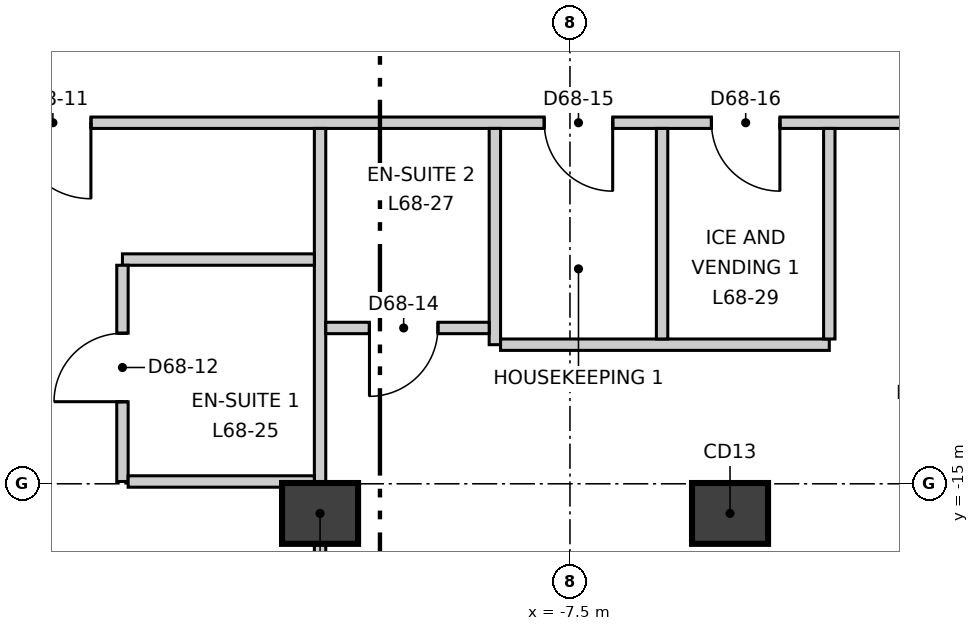
"""IFC4 building model, lengths in metres.
Left out: names, types, materials, properties, quantities, classifications, styles, units other than length and angle.
Written with IfcOpenShell. Run it as: python <this file> out.ifc"""

import sys

from ifc_helpers import new_model, si_unit, direction, frame, frame_2d, origin, origin_2d, place, context, subcontext, project, spatial, rectangle, extrude, element, fill, save


model = new_model("IFC4")
c1 = context("Model", 3, precision=1e-05, world=origin(), true_north=direction((0.0, 1.0)))
c2 = subcontext(c1, "Body", "Model", "MODEL_VIEW")
j1 = project(units=[si_unit("LENGTHUNIT", "METRE"), si_unit("PLANEANGLEUNIT", "RADIAN")], contexts=[c1])
p1 = place(None, origin())
s1 = spatial("IfcSite", under=j1, at=p1, CompositionType="ELEMENT")
p2 = place(p1, origin())
s2 = spatial("IfcBuilding", under=s1, at=p2, CompositionType="ELEMENT")
p3 = place(p2, frame((0.0, 0.0, 289.9)))
s3 = spatial("IfcBuildingStorey", under=s2, at=p3, CompositionType="ELEMENT", Elevation=289.9)
for number, where, z_axis, x_axis in (
    (1, (-10.788, -15.39, -0.3), (0.0, 0.0, 1.0), (1.0, 0.0, 0.0)),
    (2, (-5.394, -15.39, -0.3), (0.0, 0.0, 1.0), (1.0, 0.0, 0.0)),
):
    element("IfcColumn", number, at=place(p3, frame(where, z_axis=z_axis, x_axis=x_axis)), inside=s3, PredefinedType="COLUMN", context=c2, shape_type="SweptSolid", body=[
        extrude(rectangle(XDim=1.0, YDim=0.8, at=origin_2d()), origin(), (0.0, 0.0, 1.0), 3.6),
    ])
p4 = place(p3, frame((-2.494, 27.86, 0.0), z_axis=(0.0, 0.0, 1.0), x_axis=(-0.500008134474, -0.866020707292, 0.0)))
e3 = element("IfcWall", 3, at=p4, inside=s3, PredefinedType="ELEMENTEDWALL", context=c2, shape_type="SweptSolid", body=[
    extrude(rectangle(XDim=45.741, YDim=0.2, at=frame_2d((22.871, 0.0))), origin(), (0.0, 0.0, 1.0), 3.3),
])
p5 = place(p4, frame((2.15, 0.0, 0.9)))
e4 = element("IfcOpeningElement", 4, at=p5, cuts=e3, PredefinedType="OPENING", context=c2, shape_type="SweptSolid", body=[
    extrude(rectangle(XDim=3.7, YDim=2.2, at=frame_2d((1.85, 1.1))), frame((0.0, 0.11, 0.0), z_axis=(0.0, -1.0, 0.0), x_axis=(1.0, 0.0, 0.0)), (0.0, 0.0, 1.0), 0.22),
])
p6 = place(p4, frame((7.544, 0.0, 0.9)))
e5 = element("IfcOpeningElement", 5, at=p6, cuts=e3, PredefinedType="OPENING", context=c2, shape_type="SweptSolid", body=[
    extrude(rectangle(XDim=3.7, YDim=2.2, at=frame_2d((1.85, 1.1))), frame((0.0, 0.11, 0.0), z_axis=(0.0, -1.0, 0.0), x_axis=(1.0, 0.0, 0.0)), (0.0, 0.0, 1.0), 0.22),
])
p7 = place(p4, frame((12.939, 0.0, 0.9)))
e6 = element("IfcOpeningElement", 6, at=p7, cuts=e3, PredefinedType="OPENING", context=c2, shape_type="SweptSolid", body=[
    extrude(rectangle(XDim=3.7, YDim=2.2, at=frame_2d((1.85, 1.1))), frame((0.0, 0.11, 0.0), z_axis=(0.0, -1.0, 0.0), x_axis=(1.0, 0.0, 0.0)), (0.0, 0.0, 1.0), 0.22),
])
p8 = place(p4, frame((18.333, 0.0, 0.9)))
e7 = element("IfcOpeningElement", 7, at=p8, cuts=e3, PredefinedType="OPENING", context=c2, shape_type="SweptSolid", body=[
    extrude(rectangle(XDim=3.7, YDim=2.2, at=frame_2d((1.85, 1.1))), frame((0.0, 0.11, 0.0), z_axis=(0.0, -1.0, 0.0), x_axis=(1.0, 0.0, 0.0)), (0.0, 0.0, 1.0), 0.22),
])
p9 = place(p4, frame((23.728, 0.0, 0.9)))
e8 = element("IfcOpeningElement", 8, at=p9, cuts=e3, PredefinedType="OPENING", context=c2, shape_type="SweptSolid", body=[
    extrude(rectangle(XDim=3.7, YDim=2.2, at=frame_2d((1.85, 1.1))), frame((0.0, 0.11, 0.0), z_axis=(0.0, -1.0, 0.0), x_axis=(1.0, 0.0, 0.0)), (0.0, 0.0, 1.0), 0.22),
])
p10 = place(p4, frame((29.122, 0.0, 0.9)))
e9 = element("IfcOpeningElement", 9, at=p10, cuts=e3, PredefinedType="OPENING", context=c2, shape_type="SweptSolid", body=[
    extrude(rectangle(XDim=3.7, YDim=2.2, at=frame_2d((1.85, 1.1))), frame((0.0, 0.11, 0.0), z_axis=(0.0, -1.0, 0.0), x_axis=(1.0, 0.0, 0.0)), (0.0, 0.0, 1.0), 0.22),
])
p11 = place(p4, frame((34.517, 0.0, 0.9)))
e10 = element("IfcOpeningElement", 10, at=p11, cuts=e3, PredefinedType="OPENING", context=c2, shape_type="SweptSolid", body=[
    extrude(rectangle(XDim=3.7, YDim=2.2, at=frame_2d((1.85, 1.1))), frame((0.0, 0.11, 0.0), z_axis=(0.0, -1.0, 0.0), x_axis=(1.0, 0.0, 0.0)), (0.0, 0.0, 1.0), 0.22),
])
p12 = place(p4, frame((39.911, 0.0, 0.9)))
e11 = element("IfcOpeningElement", 11, at=p12, cuts=e3, PredefinedType="OPENING", context=c2, shape_type="SweptSolid", body=[
    extrude(rectangle(XDim=3.7, YDim=2.2, at=frame_2d((1.85, 1.1))), frame((0.0, 0.11, 0.0), z_axis=(0.0, -1.0, 0.0), x_axis=(1.0, 0.0, 0.0)), (0.0, 0.0, 1.0), 0.22),
])
p13 = place(p3, frame((-17.603, -10.25, 0.0), z_axis=(0.0, 0.0, 1.0), x_axis=(1.0, 0.0, 0.0)))
e12 = element("IfcWall", 12, at=p13, inside=s3, PredefinedType="PARTITIONING", context=c2, shape_type="SweptSolid", body=[
    extrude(rectangle(XDim=35.356, YDim=0.15, at=frame_2d((17.678, 0.0))), origin(), (0.0, 0.0, 1.0), 3.3),
])
p14 = place(p13, frame((2.8, 0.0, 0.0)))
e13 = element("IfcOpeningElement", 13, at=p14, cuts=e12, PredefinedType="OPENING", context=c2, shape_type="SweptSolid", body=[
    extrude(rectangle(XDim=1.0, YDim=2.1, at=frame_2d((0.5, 1.05))), frame((0.0, 0.085, 0.0), z_axis=(0.0, -1.0, 0.0), x_axis=(1.0, 0.0, 0.0)), (0.0, 0.0, 1.0), 0.17),
])
p15 = place(p13, frame((15.065, 0.0, 0.0)))
e14 = element("IfcOpeningElement", 14, at=p15, cuts=e12, PredefinedType="OPENING", context=c2, shape_type="SweptSolid", body=[
    extrude(rectangle(XDim=1.0, YDim=2.1, at=frame_2d((0.5, 1.05))), frame((0.0, 0.085, 0.0), z_axis=(0.0, -1.0, 0.0), x_axis=(1.0, 0.0, 0.0)), (0.0, 0.0, 1.0), 0.17),
])
p16 = place(p13, frame((9.765, 0.0, 0.0)))
e15 = element("IfcOpeningElement", 15, at=p16, cuts=e12, PredefinedType="OPENING", context=c2, shape_type="SweptSolid", body=[
    extrude(rectangle(XDim=0.9, YDim=2.1, at=frame_2d((0.45, 1.05))), frame((0.0, 0.085, 0.0), z_axis=(0.0, -1.0, 0.0), x_axis=(1.0, 0.0, 0.0)), (0.0, 0.0, 1.0), 0.17),
])
p17 = place(p13, frame((11.965, 0.0, 0.0)))
e16 = element("IfcOpeningElement", 16, at=p17, cuts=e12, PredefinedType="OPENING", context=c2, shape_type="SweptSolid", body=[
    extrude(rectangle(XDim=0.9, YDim=2.1, at=frame_2d((0.45, 1.05))), frame((0.0, 0.085, 0.0), z_axis=(0.0, -1.0, 0.0), x_axis=(1.0, 0.0, 0.0)), (0.0, 0.0, 1.0), 0.17),
])
p18 = place(p13, frame((20.953, 0.0, 0.0)))
e17 = element("IfcOpeningElement", 17, at=p18, cuts=e12, PredefinedType="OPENING", context=c2, shape_type="SweptSolid", body=[
    extrude(rectangle(XDim=1.0, YDim=2.1, at=frame_2d((0.5, 1.05))), frame((0.0, 0.085, 0.0), z_axis=(0.0, -1.0, 0.0), x_axis=(1.0, 0.0, 0.0)), (0.0, 0.0, 1.0), 0.17),
])
p19 = place(p13, frame((26.347, 0.0, 0.0)))
e18 = element("IfcOpeningElement", 18, at=p19, cuts=e12, PredefinedType="OPENING", context=c2, shape_type="SweptSolid", body=[
    extrude(rectangle(XDim=1.0, YDim=2.1, at=frame_2d((0.5, 1.05))), frame((0.0, 0.085, 0.0), z_axis=(0.0, -1.0, 0.0), x_axis=(1.0, 0.0, 0.0)), (0.0, 0.0, 1.0), 0.17),
])
p20 = place(p13, frame((31.342, 0.0, 0.0)))
e19 = element("IfcOpeningElement", 19, at=p20, cuts=e12, PredefinedType="OPENING", context=c2, shape_type="SweptSolid", body=[
    extrude(rectangle(XDim=1.0, YDim=2.1, at=frame_2d((0.5, 1.05))), frame((0.0, 0.085, 0.0), z_axis=(0.0, -1.0, 0.0), x_axis=(1.0, 0.0, 0.0)), (0.0, 0.0, 1.0), 0.17),
])
p21 = place(p3, frame((-17.679, -10.12, 0.0), z_axis=(0.0, 0.0, 1.0), x_axis=(0.500008955215, 0.866020233427, 0.0)))
e20 = element("IfcWall", 20, at=p21, inside=s3, PredefinedType="PARTITIONING", context=c2, shape_type="SweptSolid", body=[
    extrude(rectangle(XDim=35.357, YDim=0.15, at=frame_2d((17.679, 0.0))), origin(), (0.0, 0.0, 1.0), 3.3),
])
p22 = place(p21, frame((31.407, 0.0, 0.0)))
e21 = element("IfcOpeningElement", 21, at=p22, cuts=e20, PredefinedType="OPENING", context=c2, shape_type="SweptSolid", body=[
    extrude(rectangle(XDim=1.0, YDim=2.1, at=frame_2d((0.5, 1.05))), frame((0.0, 0.085, 0.0), z_axis=(0.0, -1.0, 0.0), x_axis=(1.0, 0.0, 0.0)), (0.0, 0.0, 1.0), 0.17),
])
p23 = place(p21, frame((25.642, 0.0, 0.0)))
e22 = element("IfcOpeningElement", 22, at=p23, cuts=e20, PredefinedType="OPENING", context=c2, shape_type="SweptSolid", body=[
    extrude(rectangle(XDim=1.0, YDim=2.1, at=frame_2d((0.5, 1.05))), frame((0.0, 0.085, 0.0), z_axis=(0.0, -1.0, 0.0), x_axis=(1.0, 0.0, 0.0)), (0.0, 0.0, 1.0), 0.17),
])
p24 = place(p21, frame((18.348, 0.0, 0.0)))
e23 = element("IfcOpeningElement", 23, at=p24, cuts=e20, PredefinedType="OPENING", context=c2, shape_type="SweptSolid", body=[
    extrude(rectangle(XDim=1.0, YDim=2.1, at=frame_2d((0.5, 1.05))), frame((0.0, 0.085, 0.0), z_axis=(0.0, -1.0, 0.0), x_axis=(1.0, 0.0, 0.0)), (0.0, 0.0, 1.0), 0.17),
])
p25 = place(p21, frame((13.254, 0.0, 0.0)))
e24 = element("IfcOpeningElement", 24, at=p25, cuts=e20, PredefinedType="OPENING", context=c2, shape_type="SweptSolid", body=[
    extrude(rectangle(XDim=1.0, YDim=2.1, at=frame_2d((0.5, 1.05))), frame((0.0, 0.085, 0.0), z_axis=(0.0, -1.0, 0.0), x_axis=(1.0, 0.0, 0.0)), (0.0, 0.0, 1.0), 0.17),
])
p26 = place(p21, frame((7.559, 0.0, 0.0)))
e25 = element("IfcOpeningElement", 25, at=p26, cuts=e20, PredefinedType="OPENING", context=c2, shape_type="SweptSolid", body=[
    extrude(rectangle(XDim=1.0, YDim=2.1, at=frame_2d((0.5, 1.05))), frame((0.0, 0.085, 0.0), z_axis=(0.0, -1.0, 0.0), x_axis=(1.0, 0.0, 0.0)), (0.0, 0.0, 1.0), 0.17),
])
p27 = place(p21, frame((2.865, 0.0, 0.0)))
e26 = element("IfcOpeningElement", 26, at=p27, cuts=e20, PredefinedType="OPENING", context=c2, shape_type="SweptSolid", body=[
    extrude(rectangle(XDim=1.0, YDim=2.1, at=frame_2d((0.5, 1.05))), frame((0.0, 0.085, 0.0), z_axis=(0.0, -1.0, 0.0), x_axis=(1.0, 0.0, 0.0)), (0.0, 0.0, 1.0), 0.17),
])
p28 = place(p3, frame((-10.788, -16.01, 0.0), z_axis=(0.0, 0.0, 1.0), x_axis=(0.0, 1.0, 0.0)))
e27 = element("IfcWall", 27, at=p28, inside=s3, PredefinedType="PARTITIONING", context=c2, shape_type="SweptSolid", body=[
    extrude(rectangle(XDim=5.685, YDim=0.15, at=frame_2d((2.843, 0.0))), origin(), (0.0, 0.0, 1.0), 3.3),
])
p29 = place(p3, frame((-8.488, -13.17, 0.0), z_axis=(0.0, 0.0, 1.0), x_axis=(0.0, 1.0, 0.0)))
e28 = element("IfcWall", 28, at=p29, inside=s3, PredefinedType="PARTITIONING", context=c2, shape_type="SweptSolid", body=[
    extrude(rectangle(XDim=2.845, YDim=0.15, at=frame_2d((1.422, 0.0))), origin(), (0.0, 0.0, 1.0), 3.3),
])
p30 = place(p3, frame((-8.413, -13.17, 0.0), z_axis=(0.0, 0.0, 1.0), x_axis=(1.0, 0.0, 0.0)))
e29 = element("IfcWall", 29, at=p30, inside=s3, PredefinedType="PARTITIONING", context=c2, shape_type="SweptSolid", body=[
    extrude(rectangle(XDim=4.325, YDim=0.15, at=frame_2d((2.163, 0.0))), origin(), (0.0, 0.0, 1.0), 3.3),
])
for number, where, z_axis, x_axis in (
    (30, (-4.088, -13.095, 0.0), (0.0, 0.0, 1.0), (0.0, 1.0, 0.0)),
    (31, (-6.288, -13.095, 0.0), (0.0, 0.0, 1.0), (0.0, 1.0, 0.0)),
):
    element("IfcWall", number, at=place(p3, frame(where, z_axis=z_axis, x_axis=x_axis)), inside=s3, PredefinedType="PARTITIONING", context=c2, shape_type="SweptSolid", body=[
        extrude(rectangle(XDim=2.77, YDim=0.15, at=frame_2d((1.385, 0.0))), origin(), (0.0, 0.0, 1.0), 3.3),
    ])
p31 = place(p3, frame((-13.388, -12.05, 0.0), z_axis=(0.0, 0.0, 1.0), x_axis=(1.0, 0.0, 0.0)))
e32 = element("IfcWall", 32, at=p31, inside=s3, PredefinedType="PARTITIONING", context=c2, shape_type="SweptSolid", body=[
    extrude(rectangle(XDim=2.525, YDim=0.15, at=frame_2d((1.262, 0.0))), origin(), (0.0, 0.0, 1.0), 3.3),
])
p32 = place(p3, frame((-13.388, -14.97, 0.0), z_axis=(0.0, 0.0, 1.0), x_axis=(0.0, 1.0, 0.0)))
e33 = element("IfcWall", 33, at=p32, inside=s3, PredefinedType="PARTITIONING", context=c2, shape_type="SweptSolid", body=[
    extrude(rectangle(XDim=2.845, YDim=0.15, at=frame_2d((1.422, 0.0))), origin(), (0.0, 0.0, 1.0), 3.3),
])
p33 = place(p32, frame((1.05, 0.0, 0.0)))
e34 = element("IfcOpeningElement", 34, at=p33, cuts=e33, PredefinedType="OPENING", context=c2, shape_type="SweptSolid", body=[
    extrude(rectangle(XDim=0.9, YDim=2.1, at=frame_2d((0.45, 1.05))), frame((0.0, 0.085, 0.0), z_axis=(0.0, -1.0, 0.0), x_axis=(1.0, 0.0, 0.0)), (0.0, 0.0, 1.0), 0.17),
])
p34 = place(p3, frame((-13.313, -14.97, 0.0), z_axis=(0.0, 0.0, 1.0), x_axis=(1.0, 0.0, 0.0)))
e35 = element("IfcWall", 35, at=p34, inside=s3, PredefinedType="PARTITIONING", context=c2, shape_type="SweptSolid", body=[
    extrude(rectangle(XDim=2.45, YDim=0.15, at=frame_2d((1.225, 0.0))), origin(), (0.0, 0.0, 1.0), 2.6),
])
p35 = place(p3, frame((-10.713, -12.95, 0.0), z_axis=(0.0, 0.0, 1.0), x_axis=(1.0, 0.0, 0.0)))
e36 = element("IfcWall", 36, at=p35, inside=s3, PredefinedType="PARTITIONING", context=c2, shape_type="SweptSolid", body=[
    extrude(rectangle(XDim=2.15, YDim=0.15, at=frame_2d((1.075, 0.0))), origin(), (0.0, 0.0, 1.0), 3.3),
])
p36 = place(p35, frame((0.575, 0.0, 0.0)))
e37 = element("IfcOpeningElement", 37, at=p36, cuts=e36, PredefinedType="OPENING", context=c2, shape_type="SweptSolid", body=[
    extrude(rectangle(XDim=0.9, YDim=2.1, at=frame_2d((0.45, 1.05))), frame((0.0, 0.085, 0.0), z_axis=(0.0, -1.0, 0.0), x_axis=(1.0, 0.0, 0.0)), (0.0, 0.0, 1.0), 0.17),
])
p37 = place(p14, origin())
e38 = element("IfcDoor", 38, at=p37, inside=s3, OperationType="SINGLE_SWING_RIGHT", PredefinedType="DOOR", context=c2, shape_type="SweptSolid", body=[
    extrude(rectangle(XDim=1.0, YDim=2.1, at=frame_2d((0.5, 1.05))), frame((0.0, 0.025, 0.0), z_axis=(0.0, -1.0, 0.0), x_axis=(1.0, 0.0, 0.0)), (0.0, 0.0, 1.0), 0.05),
])
fill(e13, e38)
p38 = place(p33, origin())
e39 = element("IfcDoor", 39, at=p38, inside=s3, OperationType="SINGLE_SWING_RIGHT", PredefinedType="DOOR", context=c2, shape_type="SweptSolid", body=[
    extrude(rectangle(XDim=0.9, YDim=2.1, at=frame_2d((0.45, 1.05))), frame((0.0, 0.025, 0.0), z_axis=(0.0, -1.0, 0.0), x_axis=(1.0, 0.0, 0.0)), (0.0, 0.0, 1.0), 0.05),
])
fill(e34, e39)
p39 = place(p36, origin())
e40 = element("IfcDoor", 40, at=p39, inside=s3, OperationType="SINGLE_SWING_LEFT", PredefinedType="DOOR", context=c2, shape_type="SweptSolid", body=[
    extrude(rectangle(XDim=0.9, YDim=2.1, at=frame_2d((0.45, 1.05))), frame((0.0, 0.025, 0.0), z_axis=(0.0, -1.0, 0.0), x_axis=(1.0, 0.0, 0.0)), (0.0, 0.0, 1.0), 0.05),
])
fill(e37, e40)
p40 = place(p16, origin())
e41 = element("IfcDoor", 41, at=p40, inside=s3, OperationType="SINGLE_SWING_RIGHT", PredefinedType="DOOR", context=c2, shape_type="SweptSolid", body=[
    extrude(rectangle(XDim=0.9, YDim=2.1, at=frame_2d((0.45, 1.05))), frame((0.0, 0.025, 0.0), z_axis=(0.0, -1.0, 0.0), x_axis=(1.0, 0.0, 0.0)), (0.0, 0.0, 1.0), 0.05),
])
fill(e15, e41)
p41 = place(p17, origin())
e42 = element("IfcDoor", 42, at=p41, inside=s3, OperationType="SINGLE_SWING_RIGHT", PredefinedType="DOOR", context=c2, shape_type="SweptSolid", body=[
    extrude(rectangle(XDim=0.9, YDim=2.1, at=frame_2d((0.45, 1.05))), frame((0.0, 0.025, 0.0), z_axis=(0.0, -1.0, 0.0), x_axis=(1.0, 0.0, 0.0)), (0.0, 0.0, 1.0), 0.05),
])
fill(e16, e42)
save(model, sys.argv[1])
